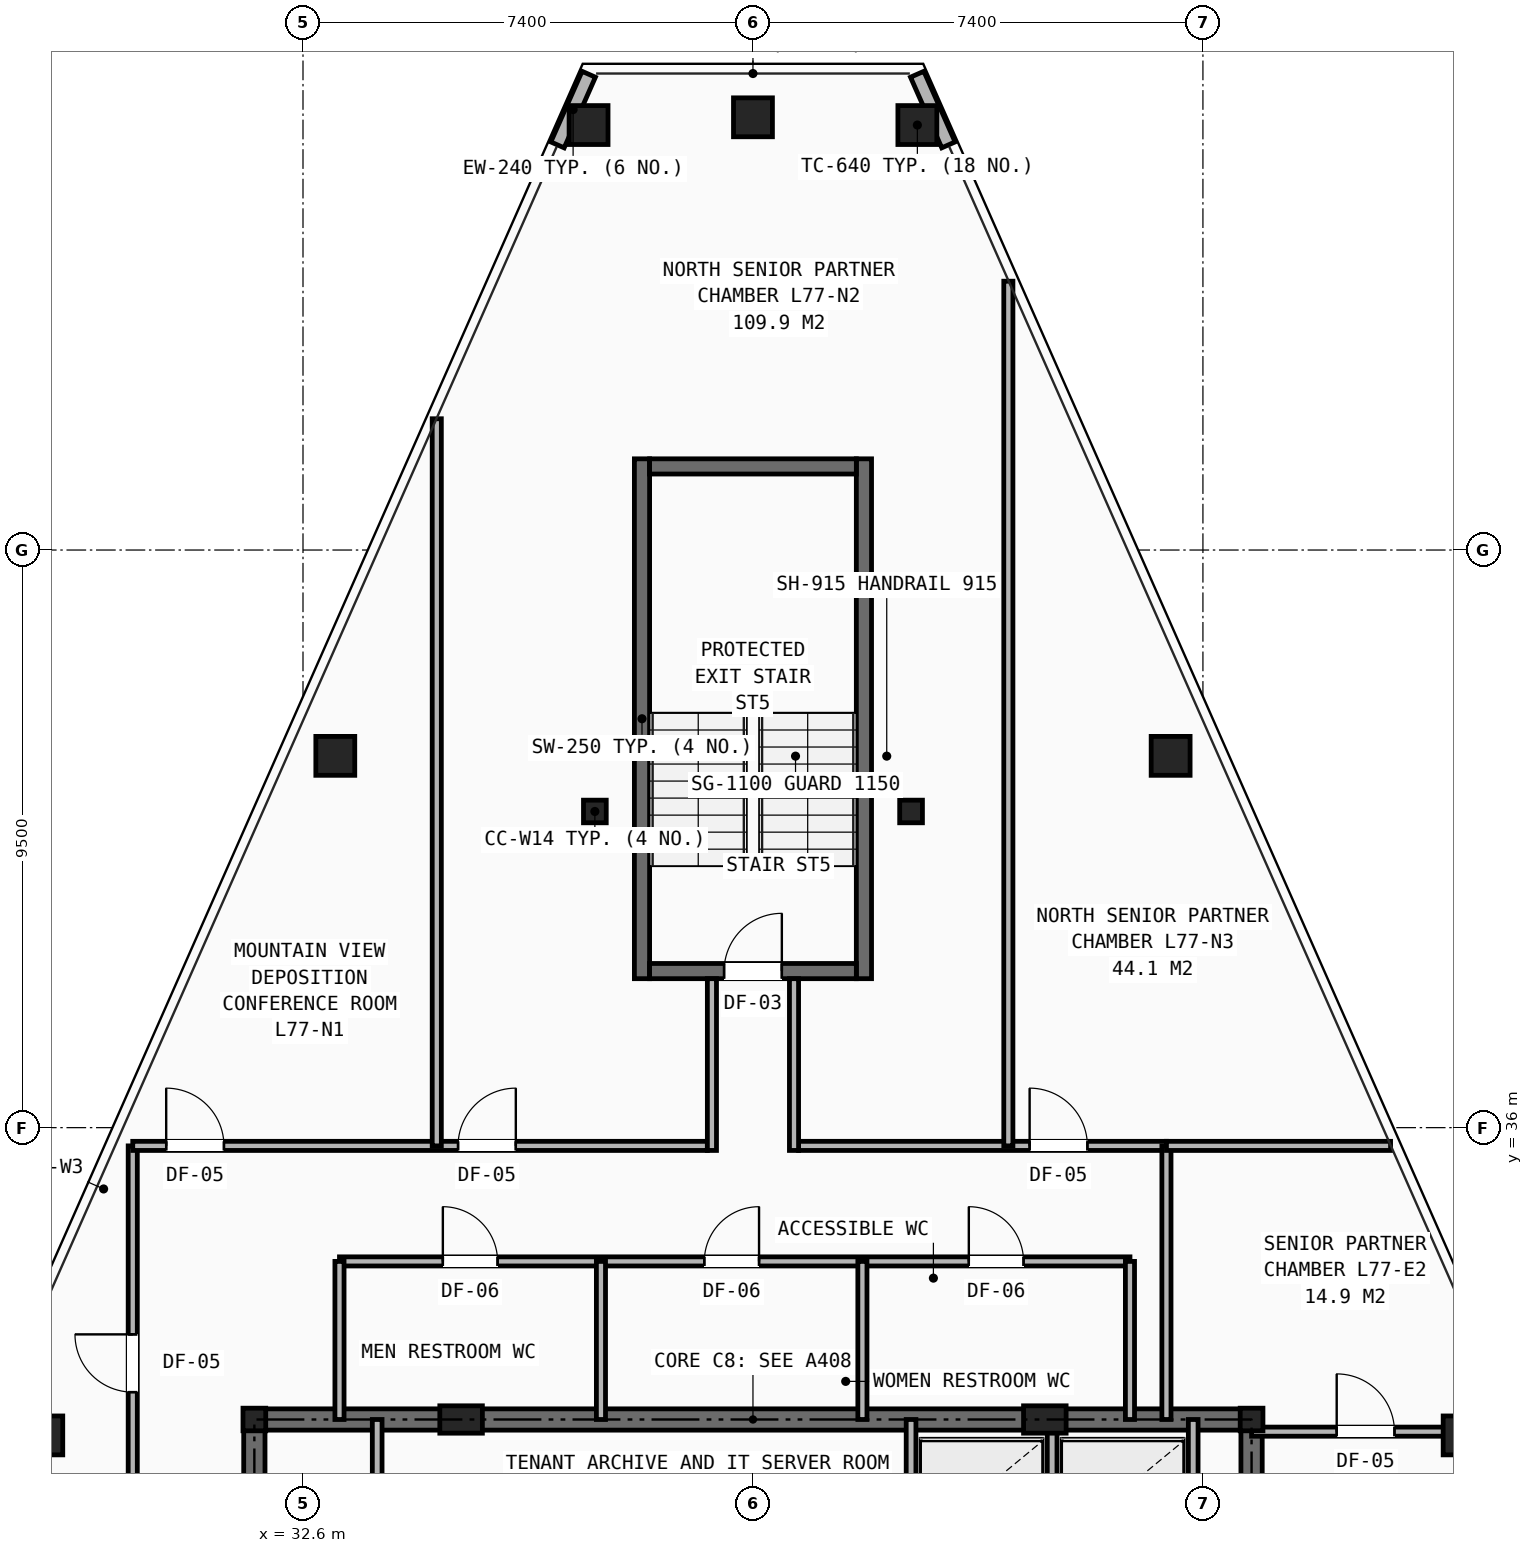
"""IFC4 building model, lengths in metres.
Left out: names, types, materials, properties, quantities, classifications, styles, units other than length and angle.
Written with IfcOpenShell. Run it as: python <this file> out.ifc"""

import sys

from ifc_helpers import new_model, si_unit, direction, frame, frame_2d, origin, origin_2d, place, context, subcontext, project, spatial, rectangle, hollow_rectangle, i_section, extrude, element, fill, save


model = new_model("IFC4")
c1 = context("Model", 3, precision=1e-05, world=origin(), true_north=direction((0.0, 1.0)))
c2 = subcontext(c1, "Body", "Model", "MODEL_VIEW")
j1 = project(units=[si_unit("LENGTHUNIT", "METRE"), si_unit("PLANEANGLEUNIT", "RADIAN")], contexts=[c1])
p1 = place(None, origin())
s1 = spatial("IfcSite", under=j1, at=p1, CompositionType="ELEMENT")
p2 = place(p1, origin())
s2 = spatial("IfcBuilding", under=s1, at=p2, CompositionType="ELEMENT")
p3 = place(p2, frame((0.0, 0.0, 272.5)))
s3 = spatial("IfcBuildingStorey", under=s2, at=p3, CompositionType="ELEMENT", Elevation=272.5)
for number, where, z_axis, x_axis in (
    (1, (31.8, 31.2, 0.0), (0.0, 0.0, 1.0), (1.0, 0.0, 0.0)),
    (2, (48.2, 31.2, 0.0), (0.0, 0.0, 1.0), (1.0, 0.0, 0.0)),
    (3, (37.4, 41.2, 0.0), (0.0, 0.0, 1.0), (1.0, 0.0, 0.0)),
    (4, (42.6, 41.2, 0.0), (0.0, 0.0, 1.0), (1.0, 0.0, 0.0)),
):
    element("IfcColumn", number, at=place(p3, frame(where, z_axis=z_axis, x_axis=x_axis)), inside=s3, PredefinedType="COLUMN", context=c2, shape_type="SweptSolid", body=[
        extrude(i_section(OverallWidth=0.374, OverallDepth=0.372, WebThickness=0.016, FlangeThickness=0.026, at=origin_2d()), origin(), (0.0, 0.0, 1.0), 3.5),
    ])
for number, where, z_axis, x_axis in (
    (5, (35.2, 31.2, 0.0), (0.0, 0.0, 1.0), (1.0, 0.0, 0.0)),
    (6, (44.8, 31.2, 0.0), (0.0, 0.0, 1.0), (1.0, 0.0, 0.0)),
):
    element("IfcColumn", number, at=place(p3, frame(where, z_axis=z_axis, x_axis=x_axis)), inside=s3, PredefinedType="PILASTER", context=c2, shape_type="SweptSolid", body=[
        extrude(rectangle(XDim=0.7, YDim=0.45, at=origin_2d()), origin(), (0.0, 0.0, 1.0), 3.5),
    ])
for number, where, z_axis, x_axis in (
    (7, (42.704, 52.49, 0.0), (0.0, 0.0, 1.0), (1.0, 0.0, 0.0)),
    (8, (40.0, 52.617, 0.0), (0.0, 0.0, 1.0), (1.0, 0.0, 0.0)),
    (9, (37.296, 52.49, 0.0), (0.0, 0.0, 1.0), (1.0, 0.0, 0.0)),
    (10, (33.131, 42.115, 0.0), (0.0, 0.0, 1.0), (1.0, 0.0, 0.0)),
    (11, (28.329, 30.938, 0.0), (0.0, 0.0, 1.0), (1.0, 0.0, 0.0)),
    (12, (51.671, 30.938, 0.0), (0.0, 0.0, 1.0), (1.0, 0.0, 0.0)),
    (13, (46.869, 42.115, 0.0), (0.0, 0.0, 1.0), (1.0, 0.0, 0.0)),
):
    element("IfcColumn", number, at=place(p3, frame(where, z_axis=z_axis, x_axis=x_axis)), inside=s3, PredefinedType="COLUMN", context=c2, shape_type="SweptSolid", body=[
        extrude(hollow_rectangle(XDim=0.64, YDim=0.64, WallThickness=0.045, at=origin_2d()), origin(), (0.0, 0.0, 1.0), 3.5),
    ])
for number, where, z_axis, x_axis in (
    (14, (37.299, 53.325, 0.0), (0.0, 0.0, 1.0), (-0.404, -0.915, 0.0)),
    (15, (43.215, 52.163, 0.0), (0.0, 0.0, 1.0), (-0.404, 0.915, 0.0)),
):
    element("IfcWall", number, at=place(p3, frame(where, z_axis=z_axis, x_axis=x_axis)), inside=s3, PredefinedType="SHEAR", context=c2, shape_type="SweptSolid", body=[
        extrude(rectangle(XDim=1.271, YDim=0.24, at=frame_2d((0.635, 0.0))), origin(), (0.0, 0.0, 1.0), 2.623),
    ])
p4 = place(p3, frame((31.8, 31.2, 0.0), z_axis=(0.0, 0.0, 1.0), x_axis=(1.0, 0.0, 0.0)))
e16 = element("IfcWall", 16, at=p4, inside=s3, PredefinedType="SHEAR", context=c2, shape_type="SweptSolid", body=[
    extrude(rectangle(XDim=16.4, YDim=0.35, at=frame_2d((8.2, 0.0))), origin(), (0.0, 0.0, 1.0), 3.25),
])
p5 = place(p3, frame((31.8, 16.4, 0.0), z_axis=(0.0, 0.0, 1.0), x_axis=(0.0, 1.0, 0.0)))
e17 = element("IfcWall", 17, at=p5, inside=s3, PredefinedType="SHEAR", context=c2, shape_type="SweptSolid", body=[
    extrude(rectangle(XDim=14.8, YDim=0.35, at=frame_2d((7.4, 0.0))), origin(), (0.0, 0.0, 1.0), 3.25),
])
p6 = place(p5, frame((11.0, 0.0, 0.0)))
e18 = element("IfcOpeningElement", 18, at=p6, cuts=e17, PredefinedType="OPENING", context=c2, shape_type="SweptSolid", body=[
    extrude(rectangle(XDim=1.1, YDim=2.15, at=frame_2d((0.55, 1.075))), frame((0.0, 0.185, 0.0), z_axis=(0.0, -1.0, 0.0), x_axis=(1.0, 0.0, 0.0)), (0.0, 0.0, 1.0), 0.37),
])
p7 = place(p3, frame((48.2, 16.4, 0.0), z_axis=(0.0, 0.0, 1.0), x_axis=(0.0, 1.0, 0.0)))
e19 = element("IfcWall", 19, at=p7, inside=s3, PredefinedType="SHEAR", context=c2, shape_type="SweptSolid", body=[
    extrude(rectangle(XDim=14.8, YDim=0.35, at=frame_2d((7.4, 0.0))), origin(), (0.0, 0.0, 1.0), 3.25),
])
p8 = place(p7, frame((11.0, 0.0, 0.0)))
e20 = element("IfcOpeningElement", 20, at=p8, cuts=e19, PredefinedType="OPENING", context=c2, shape_type="SweptSolid", body=[
    extrude(rectangle(XDim=1.1, YDim=2.15, at=frame_2d((0.55, 1.075))), frame((0.0, 0.185, 0.0), z_axis=(0.0, -1.0, 0.0), x_axis=(1.0, 0.0, 0.0)), (0.0, 0.0, 1.0), 0.37),
])
for number, where, z_axis, x_axis in (
    (21, (33.82, 29.02, 0.0), (0.0, 0.0, 1.0), (0.0, 1.0, 0.0)),
    (22, (42.6, 29.02, 0.0), (0.0, 0.0, 1.0), (0.0, 1.0, 0.0)),
    (23, (44.92, 29.02, 0.0), (0.0, 0.0, 1.0), (0.0, 1.0, 0.0)),
    (24, (47.24, 29.02, 0.0), (0.0, 0.0, 1.0), (0.0, 1.0, 0.0)),
):
    element("IfcWall", number, at=place(p3, frame(where, z_axis=z_axis, x_axis=x_axis)), inside=s3, PredefinedType="SOLIDWALL", context=c2, shape_type="SweptSolid", body=[
        extrude(rectangle(XDim=2.18, YDim=0.16, at=frame_2d((1.09, 0.0))), origin(), (0.0, 0.0, 1.0), 2.705),
    ])
p9 = place(p3, frame((33.2, 33.8, 0.0), z_axis=(0.0, 0.0, 1.0), x_axis=(1.0, 0.0, 0.0)))
e25 = element("IfcWall", 25, at=p9, inside=s3, PredefinedType="PARTITIONING", context=c2, shape_type="SweptSolid", body=[
    extrude(rectangle(XDim=13.0, YDim=0.15, at=frame_2d((6.5, 0.0))), origin(), (0.0, 0.0, 1.0), 3.25),
])
p10 = place(p9, frame((1.7, 0.0, 0.0)))
e26 = element("IfcOpeningElement", 26, at=p10, cuts=e25, PredefinedType="OPENING", context=c2, shape_type="SweptSolid", body=[
    extrude(rectangle(XDim=0.9, YDim=2.1, at=frame_2d((0.45, 1.05))), frame((0.0, 0.085, 0.0), z_axis=(0.0, -1.0, 0.0), x_axis=(1.0, 0.0, 0.0)), (0.0, 0.0, 1.0), 0.17),
])
p11 = place(p9, frame((6.0, 0.0, 0.0)))
e27 = element("IfcOpeningElement", 27, at=p11, cuts=e25, PredefinedType="OPENING", context=c2, shape_type="SweptSolid", body=[
    extrude(rectangle(XDim=0.9, YDim=2.1, at=frame_2d((0.45, 1.05))), frame((0.0, 0.085, 0.0), z_axis=(0.0, -1.0, 0.0), x_axis=(1.0, 0.0, 0.0)), (0.0, 0.0, 1.0), 0.17),
])
p12 = place(p9, frame((10.35, 0.0, 0.0)))
e28 = element("IfcOpeningElement", 28, at=p12, cuts=e25, PredefinedType="OPENING", context=c2, shape_type="SweptSolid", body=[
    extrude(rectangle(XDim=0.9, YDim=2.1, at=frame_2d((0.45, 1.05))), frame((0.0, 0.085, 0.0), z_axis=(0.0, -1.0, 0.0), x_axis=(1.0, 0.0, 0.0)), (0.0, 0.0, 1.0), 0.17),
])
for number, where, z_axis, x_axis in (
    (29, (33.2, 31.2, 0.0), (0.0, 0.0, 1.0), (0.0, 1.0, 0.0)),
    (30, (46.2, 31.2, 0.0), (0.0, 0.0, 1.0), (0.0, 1.0, 0.0)),
    (31, (37.5, 31.2, 0.0), (0.0, 0.0, 1.0), (0.0, 1.0, 0.0)),
    (32, (41.8, 31.2, 0.0), (0.0, 0.0, 1.0), (0.0, 1.0, 0.0)),
):
    element("IfcWall", number, at=place(p3, frame(where, z_axis=z_axis, x_axis=x_axis)), inside=s3, PredefinedType="PARTITIONING", context=c2, shape_type="SweptSolid", body=[
        extrude(rectangle(XDim=2.6, YDim=0.15, at=frame_2d((1.3, 0.0))), origin(), (0.0, 0.0, 1.0), 2.705),
    ])
p13 = place(p3, frame((29.8, 16.4, 0.0), z_axis=(0.0, 0.0, 1.0), x_axis=(0.0, 1.0, 0.0)))
e33 = element("IfcWall", 33, at=p13, inside=s3, PredefinedType="PARTITIONING", context=c2, shape_type="SweptSolid", body=[
    extrude(rectangle(XDim=19.3, YDim=0.15, at=frame_2d((9.65, 0.0))), origin(), (0.0, 0.0, 1.0), 2.265),
])
p14 = place(p13, frame((0.35, 0.0, 0.0)))
e34 = element("IfcOpeningElement", 34, at=p14, cuts=e33, PredefinedType="OPENING", context=c2, shape_type="SweptSolid", body=[
    extrude(rectangle(XDim=0.95, YDim=2.1, at=frame_2d((0.475, 1.05))), frame((0.0, 0.085, 0.0), z_axis=(0.0, -1.0, 0.0), x_axis=(1.0, 0.0, 0.0)), (0.0, 0.0, 1.0), 0.17),
])
p15 = place(p13, frame((7.45, 0.0, 0.0)))
e35 = element("IfcOpeningElement", 35, at=p15, cuts=e33, PredefinedType="OPENING", context=c2, shape_type="SweptSolid", body=[
    extrude(rectangle(XDim=0.95, YDim=2.1, at=frame_2d((0.475, 1.05))), frame((0.0, 0.085, 0.0), z_axis=(0.0, -1.0, 0.0), x_axis=(1.0, 0.0, 0.0)), (0.0, 0.0, 1.0), 0.17),
])
p16 = place(p13, frame((15.25, 0.0, 0.0)))
e36 = element("IfcOpeningElement", 36, at=p16, cuts=e33, PredefinedType="OPENING", context=c2, shape_type="SweptSolid", body=[
    extrude(rectangle(XDim=0.95, YDim=2.1, at=frame_2d((0.475, 1.05))), frame((0.0, 0.085, 0.0), z_axis=(0.0, -1.0, 0.0), x_axis=(1.0, 0.0, 0.0)), (0.0, 0.0, 1.0), 0.17),
])
p17 = place(p3, frame((29.8, 35.7, 0.0), z_axis=(0.0, 0.0, 1.0), x_axis=(1.0, 0.0, 0.0)))
e37 = element("IfcWall", 37, at=p17, inside=s3, PredefinedType="PARTITIONING", context=c2, shape_type="SweptSolid", body=[
    extrude(rectangle(XDim=9.45, YDim=0.15, at=frame_2d((4.725, 0.0))), origin(), (0.0, 0.0, 1.0), 2.628),
])
p18 = place(p17, frame((0.55, 0.0, 0.0)))
e38 = element("IfcOpeningElement", 38, at=p18, cuts=e37, PredefinedType="OPENING", context=c2, shape_type="SweptSolid", body=[
    extrude(rectangle(XDim=0.95, YDim=2.1, at=frame_2d((0.475, 1.05))), frame((0.0, 0.085, 0.0), z_axis=(0.0, -1.0, 0.0), x_axis=(1.0, 0.0, 0.0)), (0.0, 0.0, 1.0), 0.17),
])
p19 = place(p17, frame((5.35, 0.0, 0.0)))
e39 = element("IfcOpeningElement", 39, at=p19, cuts=e37, PredefinedType="OPENING", context=c2, shape_type="SweptSolid", body=[
    extrude(rectangle(XDim=0.95, YDim=2.1, at=frame_2d((0.475, 1.05))), frame((0.0, 0.085, 0.0), z_axis=(0.0, -1.0, 0.0), x_axis=(1.0, 0.0, 0.0)), (0.0, 0.0, 1.0), 0.17),
])
p20 = place(p3, frame((40.75, 35.7, 0.0), z_axis=(0.0, 0.0, 1.0), x_axis=(1.0, 0.0, 0.0)))
e40 = element("IfcWall", 40, at=p20, inside=s3, PredefinedType="PARTITIONING", context=c2, shape_type="SweptSolid", body=[
    extrude(rectangle(XDim=6.05, YDim=0.15, at=frame_2d((3.025, 0.0))), origin(), (0.0, 0.0, 1.0), 3.25),
])
p21 = place(p20, frame((3.8, 0.0, 0.0)))
e41 = element("IfcOpeningElement", 41, at=p21, cuts=e40, PredefinedType="OPENING", context=c2, shape_type="SweptSolid", body=[
    extrude(rectangle(XDim=0.95, YDim=2.1, at=frame_2d((0.475, 1.05))), frame((0.0, 0.085, 0.0), z_axis=(0.0, -1.0, 0.0), x_axis=(1.0, 0.0, 0.0)), (0.0, 0.0, 1.0), 0.17),
])
p22 = place(p3, frame((46.8, 31.2, 0.0), z_axis=(0.0, 0.0, 1.0), x_axis=(0.0, 1.0, 0.0)))
e42 = element("IfcWall", 42, at=p22, inside=s3, PredefinedType="PARTITIONING", context=c2, shape_type="SweptSolid", body=[
    extrude(rectangle(XDim=4.5, YDim=0.15, at=frame_2d((2.25, 0.0))), origin(), (0.0, 0.0, 1.0), 2.705),
])
p23 = place(p3, frame((46.8, 35.7, 0.0), z_axis=(0.0, 0.0, 1.0), x_axis=(1.0, 0.0, 0.0)))
e43 = element("IfcWall", 43, at=p23, inside=s3, PredefinedType="PARTITIONING", context=c2, shape_type="SweptSolid", body=[
    extrude(rectangle(XDim=3.686, YDim=0.15, at=frame_2d((1.843, 0.0))), origin(), (0.0, 0.0, 1.0), 2.628),
])
p24 = place(p3, frame((48.2, 31.0, 0.0), z_axis=(0.0, 0.0, 1.0), x_axis=(1.0, 0.0, 0.0)))
e44 = element("IfcWall", 44, at=p24, inside=s3, PredefinedType="PARTITIONING", context=c2, shape_type="SweptSolid", body=[
    extrude(rectangle(XDim=4.468, YDim=0.15, at=frame_2d((2.234, 0.0))), origin(), (0.0, 0.0, 1.0), 2.265),
])
p25 = place(p24, frame((1.4, 0.0, 0.0)))
e45 = element("IfcOpeningElement", 45, at=p25, cuts=e44, PredefinedType="OPENING", context=c2, shape_type="SweptSolid", body=[
    extrude(rectangle(XDim=0.95, YDim=2.1, at=frame_2d((0.475, 1.05))), frame((0.0, 0.085, 0.0), z_axis=(0.0, -1.0, 0.0), x_axis=(1.0, 0.0, 0.0)), (0.0, 0.0, 1.0), 0.17),
])
p26 = place(p3, frame((34.8, 35.7, 0.0), z_axis=(0.0, 0.0, 1.0), x_axis=(0.0, 1.0, 0.0)))
e46 = element("IfcWall", 46, at=p26, inside=s3, PredefinedType="PARTITIONING", context=c2, shape_type="SweptSolid", body=[
    extrude(rectangle(XDim=11.959, YDim=0.15, at=frame_2d((5.979, 0.0))), origin(), (0.0, 0.0, 1.0), 2.265),
])
p27 = place(p3, frame((44.2, 35.7, 0.0), z_axis=(0.0, 0.0, 1.0), x_axis=(0.0, 1.0, 0.0)))
e47 = element("IfcWall", 47, at=p27, inside=s3, PredefinedType="PARTITIONING", context=c2, shape_type="SweptSolid", body=[
    extrude(rectangle(XDim=14.221, YDim=0.15, at=frame_2d((7.111, 0.0))), origin(), (0.0, 0.0, 1.0), 2.265),
])
for number, where, z_axis, x_axis in (
    (48, (38.175, 38.45, 0.0), (0.0, 0.0, 1.0), (0.0, 1.0, 0.0)),
    (49, (41.825, 38.45, 0.0), (0.0, 0.0, 1.0), (0.0, 1.0, 0.0)),
):
    element("IfcWall", number, at=place(p3, frame(where, z_axis=z_axis, x_axis=x_axis)), inside=s3, PredefinedType="SHEAR", context=c2, shape_type="SweptSolid", body=[
        extrude(rectangle(XDim=8.55, YDim=0.25, at=frame_2d((4.275, 0.0))), origin(), (0.0, 0.0, 1.0), 3.25),
    ])
p28 = place(p3, frame((38.3, 38.575, 0.0), z_axis=(0.0, 0.0, 1.0), x_axis=(1.0, 0.0, 0.0)))
e50 = element("IfcWall", 50, at=p28, inside=s3, PredefinedType="SHEAR", context=c2, shape_type="SweptSolid", body=[
    extrude(rectangle(XDim=3.4, YDim=0.25, at=frame_2d((1.7, 0.0))), origin(), (0.0, 0.0, 1.0), 3.25),
])
p29 = place(p28, frame((1.225, 0.0, 0.0)))
e51 = element("IfcOpeningElement", 51, at=p29, cuts=e50, PredefinedType="OPENING", context=c2, shape_type="SweptSolid", body=[
    extrude(rectangle(XDim=0.95, YDim=2.1, at=frame_2d((0.475, 1.05))), frame((0.0, 0.135, 0.0), z_axis=(0.0, -1.0, 0.0), x_axis=(1.0, 0.0, 0.0)), (0.0, 0.0, 1.0), 0.27),
])
p30 = place(p3, frame((38.3, 46.875, 0.0), z_axis=(0.0, 0.0, 1.0), x_axis=(1.0, 0.0, 0.0)))
e52 = element("IfcWall", 52, at=p30, inside=s3, PredefinedType="SHEAR", context=c2, shape_type="SweptSolid", body=[
    extrude(rectangle(XDim=3.4, YDim=0.25, at=frame_2d((1.7, 0.0))), origin(), (0.0, 0.0, 1.0), 3.25),
])
for number, where, z_axis, x_axis in (
    (53, (39.325, 35.625, 0.0), (0.0, 0.0, 1.0), (0.0, 1.0, 0.0)),
    (54, (40.675, 35.625, 0.0), (0.0, 0.0, 1.0), (0.0, 1.0, 0.0)),
):
    element("IfcWall", number, at=place(p3, frame(where, z_axis=z_axis, x_axis=x_axis)), inside=s3, PredefinedType="PARTITIONING", context=c2, shape_type="SweptSolid", body=[
        extrude(rectangle(XDim=2.825, YDim=0.15, at=frame_2d((1.413, 0.0))), origin(), (0.0, 0.0, 1.0), 3.25),
    ])
p31 = place(p10, origin())
e55 = element("IfcDoor", 55, at=p31, inside=s3, OperationType="SINGLE_SWING_LEFT", PredefinedType="DOOR", context=c2, shape_type="SweptSolid", body=[
    extrude(rectangle(XDim=0.9, YDim=2.1, at=frame_2d((0.45, 1.05))), frame((0.0, 0.025, 0.0), z_axis=(0.0, -1.0, 0.0), x_axis=(1.0, 0.0, 0.0)), (0.0, 0.0, 1.0), 0.05),
])
fill(e26, e55)
p32 = place(p11, origin())
e56 = element("IfcDoor", 56, at=p32, inside=s3, OperationType="SINGLE_SWING_RIGHT", PredefinedType="DOOR", context=c2, shape_type="SweptSolid", body=[
    extrude(rectangle(XDim=0.9, YDim=2.1, at=frame_2d((0.45, 1.05))), frame((0.0, 0.025, 0.0), z_axis=(0.0, -1.0, 0.0), x_axis=(1.0, 0.0, 0.0)), (0.0, 0.0, 1.0), 0.05),
])
fill(e27, e56)
p33 = place(p12, origin())
e57 = element("IfcDoor", 57, at=p33, inside=s3, OperationType="SINGLE_SWING_LEFT", PredefinedType="DOOR", context=c2, shape_type="SweptSolid", body=[
    extrude(rectangle(XDim=0.9, YDim=2.1, at=frame_2d((0.45, 1.05))), frame((0.0, 0.025, 0.0), z_axis=(0.0, -1.0, 0.0), x_axis=(1.0, 0.0, 0.0)), (0.0, 0.0, 1.0), 0.05),
])
fill(e28, e57)
p34 = place(p16, origin())
e58 = element("IfcDoor", 58, at=p34, inside=s3, OperationType="SINGLE_SWING_RIGHT", PredefinedType="DOOR", context=c2, shape_type="SweptSolid", body=[
    extrude(rectangle(XDim=0.95, YDim=2.1, at=frame_2d((0.475, 1.05))), frame((0.0, 0.025, 0.0), z_axis=(0.0, -1.0, 0.0), x_axis=(1.0, 0.0, 0.0)), (0.0, 0.0, 1.0), 0.05),
])
fill(e36, e58)
p35 = place(p25, origin())
e59 = element("IfcDoor", 59, at=p35, inside=s3, OperationType="SINGLE_SWING_LEFT", PredefinedType="DOOR", context=c2, shape_type="SweptSolid", body=[
    extrude(rectangle(XDim=0.95, YDim=2.1, at=frame_2d((0.475, 1.05))), frame((0.0, 0.025, 0.0), z_axis=(0.0, -1.0, 0.0), x_axis=(1.0, 0.0, 0.0)), (0.0, 0.0, 1.0), 0.05),
])
fill(e45, e59)
p36 = place(p18, origin())
e60 = element("IfcDoor", 60, at=p36, inside=s3, OperationType="SINGLE_SWING_LEFT", PredefinedType="DOOR", context=c2, shape_type="SweptSolid", body=[
    extrude(rectangle(XDim=0.95, YDim=2.1, at=frame_2d((0.475, 1.05))), frame((0.0, 0.025, 0.0), z_axis=(0.0, -1.0, 0.0), x_axis=(1.0, 0.0, 0.0)), (0.0, 0.0, 1.0), 0.05),
])
fill(e38, e60)
p37 = place(p19, origin())
e61 = element("IfcDoor", 61, at=p37, inside=s3, OperationType="SINGLE_SWING_RIGHT", PredefinedType="DOOR", context=c2, shape_type="SweptSolid", body=[
    extrude(rectangle(XDim=0.95, YDim=2.1, at=frame_2d((0.475, 1.05))), frame((0.0, 0.025, 0.0), z_axis=(0.0, -1.0, 0.0), x_axis=(1.0, 0.0, 0.0)), (0.0, 0.0, 1.0), 0.05),
])
fill(e39, e61)
p38 = place(p21, origin())
e62 = element("IfcDoor", 62, at=p38, inside=s3, OperationType="SINGLE_SWING_LEFT", PredefinedType="DOOR", context=c2, shape_type="SweptSolid", body=[
    extrude(rectangle(XDim=0.95, YDim=2.1, at=frame_2d((0.475, 1.05))), frame((0.0, 0.025, 0.0), z_axis=(0.0, -1.0, 0.0), x_axis=(1.0, 0.0, 0.0)), (0.0, 0.0, 1.0), 0.05),
])
fill(e41, e62)
p39 = place(p29, origin())
e63 = element("IfcDoor", 63, at=p39, inside=s3, OperationType="SINGLE_SWING_RIGHT", PredefinedType="DOOR", context=c2, shape_type="SweptSolid", body=[
    extrude(rectangle(XDim=0.95, YDim=2.1, at=frame_2d((0.475, 1.05))), frame((0.0, 0.025, 0.0), z_axis=(0.0, -1.0, 0.0), x_axis=(1.0, 0.0, 0.0)), (0.0, 0.0, 1.0), 0.05),
])
fill(e51, e63)
save(model, sys.argv[1])
